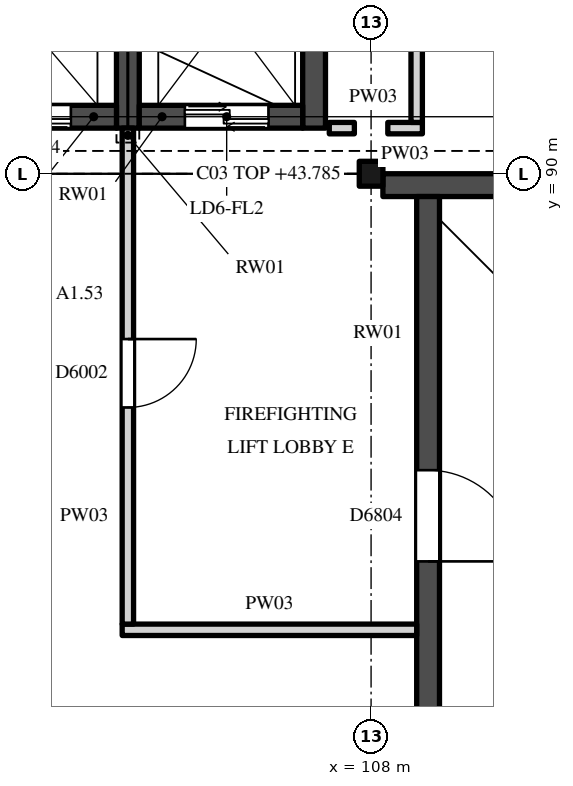
"""IFC4 building model, lengths in metres.
Left out: names, types, materials, properties, quantities, classifications, styles, units other than length and angle.
Written with IfcOpenShell. Run it as: python <this file> out.ifc"""

import sys

from ifc_helpers import new_model, si_unit, direction, frame, frame_2d, origin, origin_2d, place, context, subcontext, project, spatial, polyline, rectangle, i_section, outline, extrude, element, fill, save


model = new_model("IFC4")
c1 = context("Model", 3, precision=1e-05, world=origin(), true_north=direction((0.0, 1.0)))
c2 = subcontext(c1, "Body", "Model", "MODEL_VIEW")
j1 = project(units=[si_unit("LENGTHUNIT", "METRE"), si_unit("PLANEANGLEUNIT", "RADIAN")], contexts=[c1])
p1 = place(None, origin())
s1 = spatial("IfcSite", under=j1, at=p1, CompositionType="ELEMENT")
p2 = place(p1, origin())
s2 = spatial("IfcBuilding", under=s1, at=p2, CompositionType="ELEMENT")
p3 = place(p2, frame((0.0, 0.0, 36.0)))
s3 = spatial("IfcBuildingStorey", under=s2, at=p3, CompositionType="ELEMENT", Elevation=36.0)
p4 = place(p3, frame((108.0, 90.0, 0.0), z_axis=(0.0, 0.0, 1.0), x_axis=(1.0, 0.0, 0.0)))
e1 = element("IfcColumn", 1, at=p4, inside=s3, PredefinedType="COLUMN", context=c2, shape_type="SweptSolid", body=[
    extrude(i_section(OverallWidth=0.311, OverallDepth=0.327, WebThickness=0.016, FlangeThickness=0.025, FilletRadius=0.017, at=origin_2d()), origin(), (0.0, 0.0, 1.0), 7.785),
])
p5 = place(p3, frame((108.156, 89.85, 0.0), z_axis=(0.0, 0.0, 1.0), x_axis=(1.0, 0.0, 0.0)))
e2 = element("IfcWall", 2, at=p5, inside=s3, PredefinedType="SHEAR", context=c2, shape_type="SweptSolid", body=[
    extrude(rectangle(XDim=8.544, YDim=0.3, at=frame_2d((4.272, 0.0))), origin(), (0.0, 0.0, 1.0), 7.864),
])
p6 = place(p3, frame((108.75, 81.9, 0.0), z_axis=(0.0, 0.0, 1.0), x_axis=(0.0, 1.0, 0.0)))
e3 = element("IfcWall", 3, at=p6, inside=s3, PredefinedType="SHEAR", context=c2, shape_type="SweptSolid", body=[
    extrude(outline(polyline([(0.0, 0.0), (7.8, 0.0), (7.8, 7.984), (0.0, 14.224), (0.0, 0.0)])), frame((0.0, 0.15, 0.0), z_axis=(0.0, -1.0, 0.0), x_axis=(1.0, 0.0, 0.0)), (0.0, 0.0, 1.0), 0.3),
])
p7 = place(p6, frame((3.0, 0.0, 0.0)))
e4 = element("IfcOpeningElement", 4, at=p7, cuts=e3, PredefinedType="OPENING", context=c2, shape_type="SweptSolid", body=[
    extrude(rectangle(XDim=1.2, YDim=2.1, at=frame_2d((0.6, 1.05))), frame((0.0, 0.16, 0.0), z_axis=(0.0, -1.0, 0.0), x_axis=(1.0, 0.0, 0.0)), (0.0, 0.0, 1.0), 0.32),
])
p8 = place(p3, frame((104.8, 90.6, 0.0), z_axis=(0.0, 0.0, 1.0), x_axis=(0.0, 1.0, 0.0)))
e5 = element("IfcWall", 5, at=p8, inside=s3, PredefinedType="SHEAR", context=c2, shape_type="SweptSolid", body=[
    extrude(rectangle(XDim=3.6, YDim=0.3, at=frame_2d((1.8, 0.0))), origin(), (0.0, 0.0, 1.0), 9.644),
])
p9 = place(p3, frame((107.25, 90.6, 0.0), z_axis=(0.0, 0.0, 1.0), x_axis=(0.0, 1.0, 0.0)))
e6 = element("IfcWall", 6, at=p9, inside=s3, PredefinedType="SHEAR", context=c2, shape_type="SweptSolid", body=[
    extrude(rectangle(XDim=3.6, YDim=0.3, at=frame_2d((1.8, 0.0))), origin(), (0.0, 0.0, 1.0), 8.405),
])
p10 = place(p3, frame((104.8, 90.6, 7.8), z_axis=(0.0, 0.0, 1.0), x_axis=(0.0, -1.0, 0.0)))
e7 = element("IfcWall", 7, at=p10, inside=s3, PredefinedType="SHEAR", context=c2, shape_type="SweptSolid", body=[
    extrude(rectangle(XDim=0.19, YDim=0.3, at=frame_2d((0.095, 0.0))), origin(), (0.0, 0.0, 1.0), 1.844),
])
p11 = place(p3, frame((102.35, 90.75, 0.0), z_axis=(0.0, 0.0, 1.0), x_axis=(1.0, 0.0, 0.0)))
e8 = element("IfcWall", 8, at=p11, inside=s3, PredefinedType="SHEAR", context=c2, shape_type="SweptSolid", body=[
    extrude(outline(polyline([(0.0, 0.0), (2.3, 0.0), (2.3, 9.678), (1.278, 9.785), (1.022, 9.785), (0.0, 9.678), (0.0, 0.0)])), frame((0.0, 0.15, 0.0), z_axis=(0.0, -1.0, 0.0), x_axis=(1.0, 0.0, 0.0)), (0.0, 0.0, 1.0), 0.3),
])
p12 = place(p11, frame((0.6, 0.0, 0.0)))
e9 = element("IfcOpeningElement", 9, at=p12, cuts=e8, PredefinedType="OPENING", context=c2, shape_type="SweptSolid", body=[
    extrude(rectangle(XDim=1.1, YDim=2.1, at=frame_2d((0.55, 1.05))), frame((0.0, 0.16, 0.0), z_axis=(0.0, -1.0, 0.0), x_axis=(1.0, 0.0, 0.0)), (0.0, 0.0, 1.0), 0.32),
])
p13 = place(p3, frame((104.95, 90.75, 0.0), z_axis=(0.0, 0.0, 1.0), x_axis=(1.0, 0.0, 0.0)))
e10 = element("IfcWall", 10, at=p13, inside=s3, PredefinedType="SHEAR", context=c2, shape_type="SweptSolid", body=[
    extrude(outline(polyline([(0.0, 0.0), (2.15, 0.0), (2.15, 8.54), (1.881, 8.746), (1.075, 9.21), (0.806, 9.334), (0.0, 9.596), (0.0, 0.0)])), frame((0.0, 0.15, 0.0), z_axis=(0.0, -1.0, 0.0), x_axis=(1.0, 0.0, 0.0)), (0.0, 0.0, 1.0), 0.3),
])
p14 = place(p13, frame((0.6, 0.0, 0.0)))
e11 = element("IfcOpeningElement", 11, at=p14, cuts=e10, PredefinedType="OPENING", context=c2, shape_type="SweptSolid", body=[
    extrude(rectangle(XDim=1.1, YDim=2.1, at=frame_2d((0.55, 1.05))), frame((0.0, 0.16, 0.0), z_axis=(0.0, -1.0, 0.0), x_axis=(1.0, 0.0, 0.0)), (0.0, 0.0, 1.0), 0.32),
])
p15 = place(p3, frame((54.156, 90.15, 7.8), z_axis=(0.0, 0.0, 1.0), x_axis=(1.0, 0.0, 0.0)))
e12 = element("IfcWall", 12, at=p15, inside=s3, PredefinedType="SOLIDWALL", context=c2, shape_type="SweptSolid", body=[
    extrude(outline(polyline([(0.0, 0.0), (62.689, 0.0), (62.689, 0.071), (61.785, 0.883), (60.725, 1.494), (59.561, 1.871), (58.344, 1.999), (57.128, 1.871), (55.964, 1.494), (54.904, 0.883), (53.844, 0.05), (52.785, 0.883), (51.725, 1.494), (50.561, 1.871), (49.344, 1.999), (48.128, 1.871), (46.964, 1.494), (45.904, 0.883), (44.844, 0.05), (43.785, 0.883), (42.725, 1.494), (41.561, 1.871), (40.344, 1.999), (39.128, 1.871), (37.964, 1.494), (36.904, 0.883), (35.844, 0.05), (34.785, 0.883), (33.725, 1.494), (32.561, 1.871), (31.344, 1.999), (30.128, 1.871), (28.964, 1.494), (27.904, 0.883), (26.844, 0.05), (25.785, 0.883), (24.725, 1.494), (23.561, 1.871), (22.344, 1.999), (21.128, 1.871), (19.964, 1.494), (18.904, 0.883), (17.844, 0.05), (16.785, 0.883), (15.725, 1.494), (14.561, 1.871), (13.344, 1.999), (12.128, 1.871), (10.964, 1.494), (9.904, 0.883), (8.844, 0.05), (7.785, 0.883), (6.725, 1.494), (5.561, 1.871), (4.344, 1.999), (3.128, 1.871), (1.964, 1.494), (0.904, 0.883), (0.0, 0.071), (0.0, 0.0)])), frame((0.0, 0.15, 0.0), z_axis=(0.0, -1.0, 0.0), x_axis=(1.0, 0.0, 0.0)), (0.0, 0.0, 1.0), 0.3),
])
p16 = place(p3, frame((104.725, 84.0, 0.0), z_axis=(0.0, 0.0, 1.0), x_axis=(1.0, 0.0, 0.0)))
e13 = element("IfcWall", 13, at=p16, inside=s3, PredefinedType="PARTITIONING", context=c2, shape_type="SweptSolid", body=[
    extrude(rectangle(XDim=3.875, YDim=0.15, at=frame_2d((1.938, 0.0))), origin(), (0.0, 0.0, 1.0), 7.744),
])
p17 = place(p3, frame((107.45, 90.6, 0.0), z_axis=(0.0, 0.0, 1.0), x_axis=(1.0, 0.0, 0.0)))
e14 = element("IfcWall", 14, at=p17, inside=s3, PredefinedType="PARTITIONING", context=c2, shape_type="SweptSolid", body=[
    extrude(rectangle(XDim=0.33, YDim=0.15, at=frame_2d((0.165, 0.0))), origin(), (0.0, 0.0, 1.0), 7.731),
])
p18 = place(p3, frame((108.22, 90.6, 0.0), z_axis=(0.0, 0.0, 1.0), x_axis=(1.0, 0.0, 0.0)))
e15 = element("IfcWall", 15, at=p18, inside=s3, PredefinedType="PARTITIONING", context=c2, shape_type="SweptSolid", body=[
    extrude(rectangle(XDim=0.455, YDim=0.15, at=frame_2d((0.228, 0.0))), origin(), (0.0, 0.0, 1.0), 7.731),
])
p19 = place(p3, frame((104.8, 84.075, 0.0), z_axis=(0.0, 0.0, 1.0), x_axis=(0.0, 1.0, 0.0)))
e16 = element("IfcWall", 16, at=p19, inside=s3, PredefinedType="PARTITIONING", context=c2, shape_type="SweptSolid", body=[
    extrude(rectangle(XDim=6.525, YDim=0.15, at=frame_2d((3.263, 0.0))), origin(), (0.0, 0.0, 1.0), 7.744),
])
p20 = place(p19, frame((2.85, 0.0, 0.0)))
e17 = element("IfcOpeningElement", 17, at=p20, cuts=e16, PredefinedType="OPENING", context=c2, shape_type="SweptSolid", body=[
    extrude(rectangle(XDim=0.9, YDim=2.1, at=frame_2d((0.45, 1.05))), frame((0.0, 0.085, 0.0), z_axis=(0.0, -1.0, 0.0), x_axis=(1.0, 0.0, 0.0)), (0.0, 0.0, 1.0), 0.17),
])
p21 = place(p3, frame((108.6, 90.675, 0.0), z_axis=(0.0, 0.0, 1.0), x_axis=(0.0, 1.0, 0.0)))
e18 = element("IfcWall", 18, at=p21, inside=s3, PredefinedType="PARTITIONING", context=c2, shape_type="SweptSolid", body=[
    extrude(rectangle(XDim=3.45, YDim=0.15, at=frame_2d((1.725, 0.0))), origin(), (0.0, 0.0, 1.0), 7.731),
])
p22 = place(p7, origin())
e19 = element("IfcDoor", 19, at=p22, inside=s3, OperationType="SINGLE_SWING_LEFT", PredefinedType="DOOR", context=c2, shape_type="SweptSolid", body=[
    extrude(rectangle(XDim=1.2, YDim=2.1, at=frame_2d((0.6, 1.05))), frame((0.0, 0.025, 0.0), z_axis=(0.0, -1.0, 0.0), x_axis=(1.0, 0.0, 0.0)), (0.0, 0.0, 1.0), 0.05),
])
fill(e4, e19)
p23 = place(p12, origin())
e20 = element("IfcDoor", 20, at=p23, inside=s3, OperationType="DOUBLE_DOOR_SLIDING", PredefinedType="DOOR", context=c2, shape_type="SweptSolid", body=[
    extrude(rectangle(XDim=1.1, YDim=2.1, at=frame_2d((0.55, 1.05))), frame((0.0, 0.025, 0.0), z_axis=(0.0, -1.0, 0.0), x_axis=(1.0, 0.0, 0.0)), (0.0, 0.0, 1.0), 0.05),
])
fill(e9, e20)
p24 = place(p14, origin())
e21 = element("IfcDoor", 21, at=p24, inside=s3, OperationType="DOUBLE_DOOR_SLIDING", PredefinedType="DOOR", context=c2, shape_type="SweptSolid", body=[
    extrude(rectangle(XDim=1.1, YDim=2.1, at=frame_2d((0.55, 1.05))), frame((0.0, 0.025, 0.0), z_axis=(0.0, -1.0, 0.0), x_axis=(1.0, 0.0, 0.0)), (0.0, 0.0, 1.0), 0.05),
])
fill(e11, e21)
p25 = place(p20, origin())
e22 = element("IfcDoor", 22, at=p25, inside=s3, OperationType="SINGLE_SWING_RIGHT", PredefinedType="DOOR", context=c2, shape_type="SweptSolid", body=[
    extrude(rectangle(XDim=0.9, YDim=2.1, at=frame_2d((0.45, 1.05))), frame((0.0, 0.025, 0.0), z_axis=(0.0, -1.0, 0.0), x_axis=(1.0, 0.0, 0.0)), (0.0, 0.0, 1.0), 0.05),
])
fill(e17, e22)
save(model, sys.argv[1])
